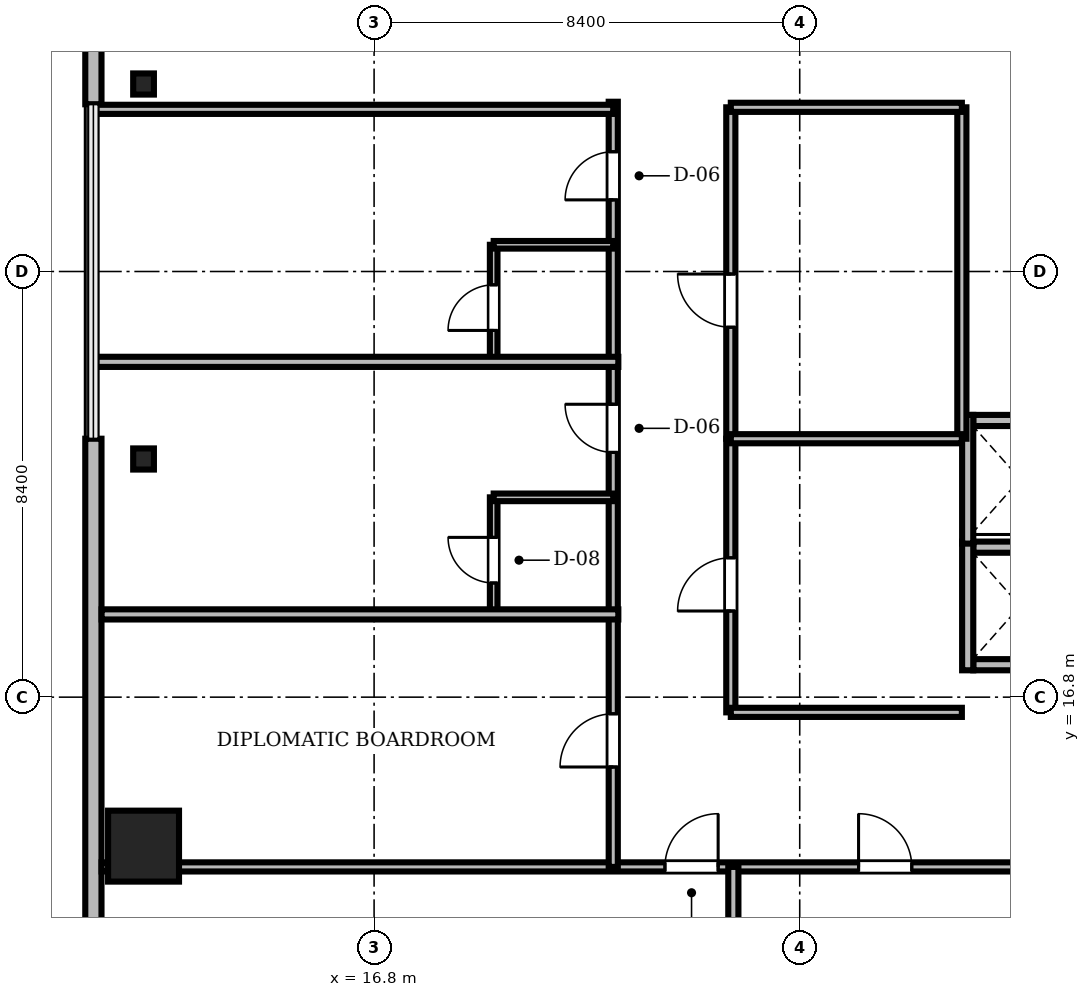
"""IFC4 building model, lengths in metres.
Left out: names, types, materials, properties, quantities, classifications, styles, units other than length and angle.
Written with IfcOpenShell. Run it as: python <this file> out.ifc"""

import sys

from ifc_helpers import new_model, si_unit, direction, frame, frame_2d, origin, origin_2d, place, context, subcontext, project, spatial, rectangle, i_section, extrude, source, transform, mapped, element, fill, save


model = new_model("IFC4")
c1 = context("Model", 3, precision=1e-05, world=origin(), true_north=direction((0.0, 1.0)))
c2 = subcontext(c1, "Body", "Model", "MODEL_VIEW")
j1 = project(units=[si_unit("LENGTHUNIT", "METRE"), si_unit("PLANEANGLEUNIT", "RADIAN")], contexts=[c1])
p1 = place(None, origin())
s1 = spatial("IfcSite", under=j1, at=p1, CompositionType="ELEMENT")
p2 = place(p1, origin())
s2 = spatial("IfcBuilding", under=s1, at=p2, CompositionType="ELEMENT")
p3 = place(p2, frame((0.0, 0.0, 203.55)))
s3 = spatial("IfcBuildingStorey", under=s2, at=p3, CompositionType="ELEMENT", Elevation=203.55)
m1 = source(origin(), c2, "Body", "SweptSolid", [
    extrude(rectangle(XDim=1.4, YDim=1.4, at=origin_2d()), origin(), (0.0, 0.0, 1.0), 3.53),
])
p4 = place(p3, frame((12.25, 13.86, 0.0), z_axis=(0.0, 0.0, 1.0), x_axis=(1.0, 0.0, 0.0)))
e1 = element("IfcColumn", 1, at=p4, inside=s3, PredefinedType="COLUMN", context=c2, shape_type="MappedRepresentation", body=[
    mapped(m1, transform((0.0, 0.0, 0.0), scale=1.0)),
])
m2 = source(origin(), c2, "Body", "SweptSolid", [
    extrude(i_section(OverallWidth=0.409, OverallDepth=0.417, WebThickness=0.021, FlangeThickness=0.033, FilletRadius=0.015, at=origin_2d()), origin(), (0.0, 0.0, 1.0), 3.53),
])
for number, where, z_axis, x_axis in (
    (2, (12.25, 28.9, 0.0), (0.0, 0.0, 1.0), (1.0, 0.0, 0.0)),
    (3, (12.25, 21.5, 0.0), (0.0, 0.0, 1.0), (1.0, 0.0, 0.0)),
):
    element("IfcColumn", number, at=place(p3, frame(where, z_axis=z_axis, x_axis=x_axis)), inside=s3, PredefinedType="COLUMN", context=c2, shape_type="MappedRepresentation", body=[
        mapped(m2, transform((0.0, 0.0, 0.0), scale=1.0)),
    ])
m3 = source(origin(), c2, "Body", "SweptSolid", [
    extrude(rectangle(XDim=15.6, YDim=0.32, at=frame_2d((7.8, 0.0))), origin(), (0.0, 0.0, 1.0), 3.53),
])
p5 = place(p3, frame((11.26, 44.1, 0.0), z_axis=(0.0, 0.0, 1.0), x_axis=(0.0, -1.0, 0.0)))
e4 = element("IfcWall", 4, at=p5, inside=s3, PredefinedType="SOLIDWALL", context=c2, shape_type="MappedRepresentation", body=[
    mapped(m3, transform((0.0, 0.0, 0.0), scale=1.0)),
])
m4 = source(origin(), c2, "Body", "SweptSolid", [
    extrude(rectangle(XDim=1.4, YDim=2.3, at=frame_2d((0.7, 1.15))), frame((0.0, 0.17, 0.0), z_axis=(0.0, -1.0, 0.0), x_axis=(1.0, 0.0, 0.0)), (0.0, 0.0, 1.0), 0.34),
])
p6 = place(p5, frame((9.61, 0.0, 0.0)))
e5 = element("IfcOpeningElement", 5, at=p6, cuts=e4, PredefinedType="OPENING", context=c2, shape_type="MappedRepresentation", body=[
    mapped(m4, transform((0.0, 0.0, 0.0), scale=1.0)),
])
m5 = source(origin(), c2, "Body", "SweptSolid", [
    extrude(rectangle(XDim=2.8, YDim=2.4, at=frame_2d((1.4, 1.2))), frame((0.0, 0.17, 0.0), z_axis=(0.0, -1.0, 0.0), x_axis=(1.0, 0.0, 0.0)), (0.0, 0.0, 1.0), 0.34),
])
p7 = place(p5, frame((2.705, 0.0, 0.72)))
e6 = element("IfcOpeningElement", 6, at=p7, cuts=e4, PredefinedType="OPENING", context=c2, shape_type="MappedRepresentation", body=[
    mapped(m5, transform((0.0, 0.0, 0.0), scale=1.0)),
])
m6 = source(origin(), c2, "Body", "SweptSolid", [
    extrude(rectangle(XDim=15.6, YDim=0.32, at=frame_2d((7.8, 0.0))), origin(), (0.0, 0.0, 1.0), 3.53),
])
p8 = place(p3, frame((11.26, 21.9, 0.0), z_axis=(0.0, 0.0, 1.0), x_axis=(0.0, -1.0, 0.0)))
e7 = element("IfcWall", 7, at=p8, inside=s3, PredefinedType="SOLIDWALL", context=c2, shape_type="MappedRepresentation", body=[
    mapped(m6, transform((0.0, 0.0, 0.0), scale=1.0)),
])
p9 = place(p8, frame((10.095, 0.0, 0.72)))
e8 = element("IfcOpeningElement", 8, at=p9, cuts=e7, PredefinedType="OPENING", context=c2, shape_type="MappedRepresentation", body=[
    mapped(m5, transform((0.0, 0.0, 0.0), scale=1.0)),
])
m7 = source(origin(), c2, "Body", "SweptSolid", [
    extrude(rectangle(XDim=1.85, YDim=0.22, at=frame_2d((0.925, 0.0))), origin(), (0.0, 0.0, 1.0), 2.972),
])
p10 = place(p3, frame((28.625, 17.44, 0.0), z_axis=(0.0, 0.0, 1.0), x_axis=(1.0, 0.0, 0.0)))
e9 = element("IfcWall", 9, at=p10, inside=s3, PredefinedType="SOLIDWALL", context=c2, shape_type="MappedRepresentation", body=[
    mapped(m7, transform((0.0, 0.0, 0.0), scale=1.0)),
])
m8 = source(origin(), c2, "Body", "SweptSolid", [
    extrude(rectangle(XDim=1.85, YDim=0.22, at=frame_2d((0.925, 0.0))), origin(), (0.0, 0.0, 1.0), 3.53),
])
p11 = place(p3, frame((28.625, 19.76, 0.0), z_axis=(0.0, 0.0, 1.0), x_axis=(1.0, 0.0, 0.0)))
e10 = element("IfcWall", 10, at=p11, inside=s3, PredefinedType="SOLIDWALL", context=c2, shape_type="MappedRepresentation", body=[
    mapped(m8, transform((0.0, 0.0, 0.0), scale=1.0)),
])
m9 = source(origin(), c2, "Body", "SweptSolid", [
    extrude(rectangle(XDim=2.54, YDim=0.22, at=frame_2d((1.27, 0.0))), origin(), (0.0, 0.0, 1.0), 2.972),
])
p12 = place(p3, frame((28.515, 17.33, 0.0), z_axis=(0.0, 0.0, 1.0), x_axis=(0.0, 1.0, 0.0)))
e11 = element("IfcWall", 11, at=p12, inside=s3, PredefinedType="SOLIDWALL", context=c2, shape_type="MappedRepresentation", body=[
    mapped(m9, transform((0.0, 0.0, 0.0), scale=1.0)),
])
p13 = place(p3, frame((28.625, 22.26, 0.0), z_axis=(0.0, 0.0, 1.0), x_axis=(1.0, 0.0, 0.0)))
e12 = element("IfcWall", 12, at=p13, inside=s3, PredefinedType="SOLIDWALL", context=c2, shape_type="MappedRepresentation", body=[
    mapped(m8, transform((0.0, 0.0, 0.0), scale=1.0)),
])
m10 = source(origin(), c2, "Body", "SweptSolid", [
    extrude(rectangle(XDim=2.54, YDim=0.22, at=frame_2d((1.27, 0.0))), origin(), (0.0, 0.0, 1.0), 3.53),
])
p14 = place(p3, frame((28.515, 19.83, 0.0), z_axis=(0.0, 0.0, 1.0), x_axis=(0.0, 1.0, 0.0)))
e13 = element("IfcWall", 13, at=p14, inside=s3, PredefinedType="SOLIDWALL", context=c2, shape_type="MappedRepresentation", body=[
    mapped(m10, transform((0.0, 0.0, 0.0), scale=1.0)),
])
m11 = source(origin(), c2, "Body", "SweptSolid", [
    extrude(rectangle(XDim=46.156, YDim=0.18, at=frame_2d((23.078, 0.0))), origin(), (0.0, 0.0, 1.0), 2.772),
])
p15 = place(p3, frame((11.422, 13.45, 0.0), z_axis=(0.0, 0.0, 1.0), x_axis=(1.0, 0.0, 0.0)))
e14 = element("IfcWall", 14, at=p15, inside=s3, PredefinedType="PARTITIONING", context=c2, shape_type="MappedRepresentation", body=[
    mapped(m11, transform((0.0, 0.0, 0.0), scale=1.0)),
])
m12 = source(origin(), c2, "Body", "SweptSolid", [
    extrude(rectangle(XDim=1.05, YDim=2.2, at=frame_2d((0.525, 1.1))), frame((0.0, 0.1, 0.0), z_axis=(0.0, -1.0, 0.0), x_axis=(1.0, 0.0, 0.0)), (0.0, 0.0, 1.0), 0.2),
])
p16 = place(p15, frame((11.118, 0.0, 0.0)))
e15 = element("IfcOpeningElement", 15, at=p16, cuts=e14, PredefinedType="OPENING", context=c2, shape_type="MappedRepresentation", body=[
    mapped(m12, transform((0.0, 0.0, 0.0), scale=1.0)),
])
p17 = place(p15, frame((14.939, 0.0, 0.0)))
e16 = element("IfcOpeningElement", 16, at=p17, cuts=e14, PredefinedType="OPENING", context=c2, shape_type="MappedRepresentation", body=[
    mapped(m12, transform((0.0, 0.0, 0.0), scale=1.0)),
])
p18 = place(p15, frame((20.922, 0.0, 0.0)))
e17 = element("IfcOpeningElement", 17, at=p18, cuts=e14, PredefinedType="OPENING", context=c2, shape_type="MappedRepresentation", body=[
    mapped(m12, transform((0.0, 0.0, 0.0), scale=1.0)),
])
p19 = place(p15, frame((26.904, 0.0, 0.0)))
e18 = element("IfcOpeningElement", 18, at=p19, cuts=e14, PredefinedType="OPENING", context=c2, shape_type="MappedRepresentation", body=[
    mapped(m12, transform((0.0, 0.0, 0.0), scale=1.0)),
])
p20 = place(p15, frame((32.887, 0.0, 0.0)))
e19 = element("IfcOpeningElement", 19, at=p20, cuts=e14, PredefinedType="OPENING", context=c2, shape_type="MappedRepresentation", body=[
    mapped(m12, transform((0.0, 0.0, 0.0), scale=1.0)),
])
p21 = place(p15, frame((37.498, 0.0, 0.0)))
e20 = element("IfcOpeningElement", 20, at=p21, cuts=e14, PredefinedType="OPENING", context=c2, shape_type="MappedRepresentation", body=[
    mapped(m12, transform((0.0, 0.0, 0.0), scale=1.0)),
])
m13 = source(origin(), c2, "Body", "SweptSolid", [
    extrude(rectangle(XDim=15.1, YDim=0.18, at=frame_2d((7.55, 0.0))), origin(), (0.0, 0.0, 1.0), 2.972),
])
p22 = place(p3, frame((21.52, 13.45, 0.0), z_axis=(0.0, 0.0, 1.0), x_axis=(0.0, 1.0, 0.0)))
e21 = element("IfcWall", 21, at=p22, inside=s3, PredefinedType="PARTITIONING", context=c2, shape_type="MappedRepresentation", body=[
    mapped(m13, transform((0.0, 0.0, 0.0), scale=1.0)),
])
p23 = place(p22, frame((1.972, 0.0, 0.0)))
e22 = element("IfcOpeningElement", 22, at=p23, cuts=e21, PredefinedType="OPENING", context=c2, shape_type="MappedRepresentation", body=[
    mapped(m12, transform((0.0, 0.0, 0.0), scale=1.0)),
])
m14 = source(origin(), c2, "Body", "SweptSolid", [
    extrude(rectangle(XDim=0.95, YDim=2.15, at=frame_2d((0.475, 1.075))), frame((0.0, 0.1, 0.0), z_axis=(0.0, -1.0, 0.0), x_axis=(1.0, 0.0, 0.0)), (0.0, 0.0, 1.0), 0.2),
])
p24 = place(p22, frame((8.18, 0.0, 0.0)))
e23 = element("IfcOpeningElement", 23, at=p24, cuts=e21, PredefinedType="OPENING", context=c2, shape_type="MappedRepresentation", body=[
    mapped(m14, transform((0.0, 0.0, 0.0), scale=1.0)),
])
p25 = place(p22, frame((13.163, 0.0, 0.0)))
e24 = element("IfcOpeningElement", 24, at=p25, cuts=e21, PredefinedType="OPENING", context=c2, shape_type="MappedRepresentation", body=[
    mapped(m14, transform((0.0, 0.0, 0.0), scale=1.0)),
])
m15 = source(origin(), c2, "Body", "SweptSolid", [
    extrude(rectangle(XDim=6.54, YDim=0.18, at=frame_2d((3.27, 0.0))), origin(), (0.0, 0.0, 1.0), 2.972),
])
p26 = place(p3, frame((23.84, 21.9, 0.0), z_axis=(0.0, 0.0, 1.0), x_axis=(0.0, 1.0, 0.0)))
e25 = element("IfcWall", 25, at=p26, inside=s3, PredefinedType="PARTITIONING", context=c2, shape_type="MappedRepresentation", body=[
    mapped(m15, transform((0.0, 0.0, 0.0), scale=1.0)),
])
p27 = place(p26, frame((2.2, 0.0, 0.0)))
e26 = element("IfcOpeningElement", 26, at=p27, cuts=e25, PredefinedType="OPENING", context=c2, shape_type="MappedRepresentation", body=[
    mapped(m12, transform((0.0, 0.0, 0.0), scale=1.0)),
])
m16 = source(origin(), c2, "Body", "SweptSolid", [
    extrude(rectangle(XDim=5.4, YDim=0.18, at=frame_2d((2.7, 0.0))), origin(), (0.0, 0.0, 1.0), 2.972),
])
p28 = place(p3, frame((23.84, 16.5, 0.0), z_axis=(0.0, 0.0, 1.0), x_axis=(0.0, 1.0, 0.0)))
e27 = element("IfcWall", 27, at=p28, inside=s3, PredefinedType="PARTITIONING", context=c2, shape_type="MappedRepresentation", body=[
    mapped(m16, transform((0.0, 0.0, 0.0), scale=1.0)),
])
p29 = place(p28, frame((2.0, 0.0, 0.0)))
e28 = element("IfcOpeningElement", 28, at=p29, cuts=e27, PredefinedType="OPENING", context=c2, shape_type="MappedRepresentation", body=[
    mapped(m12, transform((0.0, 0.0, 0.0), scale=1.0)),
])
m17 = source(origin(), c2, "Body", "SweptSolid", [
    extrude(rectangle(XDim=2.29, YDim=0.15, at=frame_2d((1.145, 0.0))), origin(), (0.0, 0.0, 1.0), 2.972),
])
p30 = place(p3, frame((19.16, 18.453, 0.0), z_axis=(0.0, 0.0, 1.0), x_axis=(0.0, 1.0, 0.0)))
e29 = element("IfcWall", 29, at=p30, inside=s3, PredefinedType="PARTITIONING", context=c2, shape_type="MappedRepresentation", body=[
    mapped(m17, transform((0.0, 0.0, 0.0), scale=1.0)),
])
m18 = source(origin(), c2, "Body", "SweptSolid", [
    extrude(rectangle(XDim=0.9, YDim=2.1, at=frame_2d((0.45, 1.05))), frame((0.0, 0.085, 0.0), z_axis=(0.0, -1.0, 0.0), x_axis=(1.0, 0.0, 0.0)), (0.0, 0.0, 1.0), 0.17),
])
p31 = place(p30, frame((0.6, 0.0, 0.0)))
e30 = element("IfcOpeningElement", 30, at=p31, cuts=e29, PredefinedType="OPENING", context=c2, shape_type="MappedRepresentation", body=[
    mapped(m18, transform((0.0, 0.0, 0.0), scale=1.0)),
])
m19 = source(origin(), c2, "Body", "SweptSolid", [
    extrude(rectangle(XDim=2.29, YDim=0.15, at=frame_2d((1.145, 0.0))), origin(), (0.0, 0.0, 1.0), 3.192),
])
p32 = place(p3, frame((19.16, 23.437, 0.0), z_axis=(0.0, 0.0, 1.0), x_axis=(0.0, 1.0, 0.0)))
e31 = element("IfcWall", 31, at=p32, inside=s3, PredefinedType="PARTITIONING", context=c2, shape_type="MappedRepresentation", body=[
    mapped(m19, transform((0.0, 0.0, 0.0), scale=1.0)),
])
p33 = place(p32, frame((0.6, 0.0, 0.0)))
e32 = element("IfcOpeningElement", 32, at=p33, cuts=e31, PredefinedType="OPENING", context=c2, shape_type="MappedRepresentation", body=[
    mapped(m18, transform((0.0, 0.0, 0.0), scale=1.0)),
])
m20 = source(origin(), c2, "Body", "SweptSolid", [
    extrude(rectangle(XDim=11.328, YDim=0.2, at=frame_2d((5.664, 0.0))), origin(), (0.0, 0.0, 1.0), 2.772),
])
p34 = place(p3, frame((23.89, 2.122, 0.0), z_axis=(0.0, 0.0, 1.0), x_axis=(0.0, 1.0, 0.0)))
e33 = element("IfcWall", 33, at=p34, inside=s3, PredefinedType="PARTITIONING", context=c2, shape_type="MappedRepresentation", body=[
    mapped(m20, transform((0.0, 0.0, 0.0), scale=1.0)),
])
m21 = source(origin(), c2, "Body", "SweptSolid", [
    extrude(rectangle(XDim=10.198, YDim=0.2, at=frame_2d((5.099, 0.0))), origin(), (0.0, 0.0, 1.0), 2.772),
])
p35 = place(p3, frame((11.422, 18.433, 0.0), z_axis=(0.0, 0.0, 1.0), x_axis=(1.0, 0.0, 0.0)))
e34 = element("IfcWall", 34, at=p35, inside=s3, PredefinedType="PARTITIONING", context=c2, shape_type="MappedRepresentation", body=[
    mapped(m21, transform((0.0, 0.0, 0.0), scale=1.0)),
])
m22 = source(origin(), c2, "Body", "SweptSolid", [
    extrude(rectangle(XDim=10.39, YDim=0.2, at=frame_2d((5.195, 0.0))), origin(), (0.0, 0.0, 1.0), 2.772),
])
p36 = place(p3, frame((11.23, 23.417, 0.0), z_axis=(0.0, 0.0, 1.0), x_axis=(1.0, 0.0, 0.0)))
e35 = element("IfcWall", 35, at=p36, inside=s3, PredefinedType="PARTITIONING", context=c2, shape_type="MappedRepresentation", body=[
    mapped(m22, transform((0.0, 0.0, 0.0), scale=1.0)),
])
m23 = source(origin(), c2, "Body", "SweptSolid", [
    extrude(rectangle(XDim=10.29, YDim=0.18, at=frame_2d((5.145, 0.0))), origin(), (0.0, 0.0, 1.0), 2.772),
])
p37 = place(p3, frame((11.23, 28.4, 0.0), z_axis=(0.0, 0.0, 1.0), x_axis=(1.0, 0.0, 0.0)))
e36 = element("IfcWall", 36, at=p37, inside=s3, PredefinedType="PARTITIONING", context=c2, shape_type="MappedRepresentation", body=[
    mapped(m23, transform((0.0, 0.0, 0.0), scale=1.0)),
])
p38 = place(p3, frame((28.4, 21.9, 0.0), z_axis=(0.0, 0.0, 1.0), x_axis=(0.0, 1.0, 0.0)))
e37 = element("IfcWall", 37, at=p38, inside=s3, PredefinedType="PARTITIONING", context=c2, shape_type="MappedRepresentation", body=[
    mapped(m15, transform((0.0, 0.0, 0.0), scale=1.0)),
])
m24 = source(origin(), c2, "Body", "SweptSolid", [
    extrude(rectangle(XDim=4.56, YDim=0.18, at=frame_2d((2.28, 0.0))), origin(), (0.0, 0.0, 1.0), 3.53),
])
for number, where, z_axis, x_axis in (
    (38, (23.84, 16.5, 0.0), (0.0, 0.0, 1.0), (1.0, 0.0, 0.0)),
    (39, (23.84, 21.9, 0.0), (0.0, 0.0, 1.0), (1.0, 0.0, 0.0)),
    (40, (23.84, 28.44, 0.0), (0.0, 0.0, 1.0), (1.0, 0.0, 0.0)),
):
    element("IfcWall", number, at=place(p3, frame(where, z_axis=z_axis, x_axis=x_axis)), inside=s3, PredefinedType="PARTITIONING", context=c2, shape_type="MappedRepresentation", body=[
        mapped(m24, transform((0.0, 0.0, 0.0), scale=1.0)),
    ])
m25 = source(origin(), c2, "Body", "SweptSolid", [
    extrude(rectangle(XDim=2.36, YDim=0.15, at=frame_2d((1.18, 0.0))), origin(), (0.0, 0.0, 1.0), 3.53),
])
for number, where, z_axis, x_axis in (
    (41, (19.16, 20.743, 0.0), (0.0, 0.0, 1.0), (1.0, 0.0, 0.0)),
    (42, (19.16, 25.727, 0.0), (0.0, 0.0, 1.0), (1.0, 0.0, 0.0)),
):
    element("IfcWall", number, at=place(p3, frame(where, z_axis=z_axis, x_axis=x_axis)), inside=s3, PredefinedType="PARTITIONING", context=c2, shape_type="MappedRepresentation", body=[
        mapped(m25, transform((0.0, 0.0, 0.0), scale=1.0)),
    ])
m26 = source(origin(), c2, "Body", "SweptSolid", [
    extrude(rectangle(XDim=1.05, YDim=2.2, at=frame_2d((0.525, 1.1))), frame((0.0, 0.025, 0.0), z_axis=(0.0, -1.0, 0.0), x_axis=(1.0, 0.0, 0.0)), (0.0, 0.0, 1.0), 0.05),
])
p39 = place(p16, origin())
e43 = element("IfcDoor", 43, at=p39, inside=s3, OperationType="SINGLE_SWING_RIGHT", PredefinedType="DOOR", context=c2, shape_type="MappedRepresentation", body=[
    mapped(m26, transform((0.0, 0.0, 0.0), scale=1.0)),
])
fill(e15, e43)
p40 = place(p17, origin())
e44 = element("IfcDoor", 44, at=p40, inside=s3, OperationType="SINGLE_SWING_LEFT", PredefinedType="DOOR", context=c2, shape_type="MappedRepresentation", body=[
    mapped(m26, transform((0.0, 0.0, 0.0), scale=1.0)),
])
fill(e16, e44)
p41 = place(p23, origin())
e45 = element("IfcDoor", 45, at=p41, inside=s3, OperationType="SINGLE_SWING_LEFT", PredefinedType="DOOR", context=c2, shape_type="MappedRepresentation", body=[
    mapped(m26, transform((0.0, 0.0, 0.0), scale=1.0)),
])
fill(e22, e45)
m27 = source(origin(), c2, "Body", "SweptSolid", [
    extrude(rectangle(XDim=0.95, YDim=2.15, at=frame_2d((0.475, 1.075))), frame((0.0, 0.025, 0.0), z_axis=(0.0, -1.0, 0.0), x_axis=(1.0, 0.0, 0.0)), (0.0, 0.0, 1.0), 0.05),
])
p42 = place(p24, origin())
e46 = element("IfcDoor", 46, at=p42, inside=s3, OperationType="SINGLE_SWING_RIGHT", PredefinedType="DOOR", context=c2, shape_type="MappedRepresentation", body=[
    mapped(m27, transform((0.0, 0.0, 0.0), scale=1.0)),
])
fill(e23, e46)
p43 = place(p25, origin())
e47 = element("IfcDoor", 47, at=p43, inside=s3, OperationType="SINGLE_SWING_LEFT", PredefinedType="DOOR", context=c2, shape_type="MappedRepresentation", body=[
    mapped(m27, transform((0.0, 0.0, 0.0), scale=1.0)),
])
fill(e24, e47)
p44 = place(p27, origin())
e48 = element("IfcDoor", 48, at=p44, inside=s3, OperationType="SINGLE_SWING_RIGHT", PredefinedType="DOOR", context=c2, shape_type="MappedRepresentation", body=[
    mapped(m26, transform((0.0, 0.0, 0.0), scale=1.0)),
])
fill(e26, e48)
p45 = place(p29, origin())
e49 = element("IfcDoor", 49, at=p45, inside=s3, OperationType="SINGLE_SWING_LEFT", PredefinedType="DOOR", context=c2, shape_type="MappedRepresentation", body=[
    mapped(m26, transform((0.0, 0.0, 0.0), scale=1.0)),
])
fill(e28, e49)
m28 = source(origin(), c2, "Body", "SweptSolid", [
    extrude(rectangle(XDim=0.9, YDim=2.1, at=frame_2d((0.45, 1.05))), frame((0.0, 0.025, 0.0), z_axis=(0.0, -1.0, 0.0), x_axis=(1.0, 0.0, 0.0)), (0.0, 0.0, 1.0), 0.05),
])
p46 = place(p31, origin())
e50 = element("IfcDoor", 50, at=p46, inside=s3, OperationType="SINGLE_SWING_RIGHT", PredefinedType="DOOR", context=c2, shape_type="MappedRepresentation", body=[
    mapped(m28, transform((0.0, 0.0, 0.0), scale=1.0)),
])
fill(e30, e50)
p47 = place(p33, origin())
e51 = element("IfcDoor", 51, at=p47, inside=s3, OperationType="SINGLE_SWING_LEFT", PredefinedType="DOOR", context=c2, shape_type="MappedRepresentation", body=[
    mapped(m28, transform((0.0, 0.0, 0.0), scale=1.0)),
])
fill(e32, e51)
save(model, sys.argv[1])
